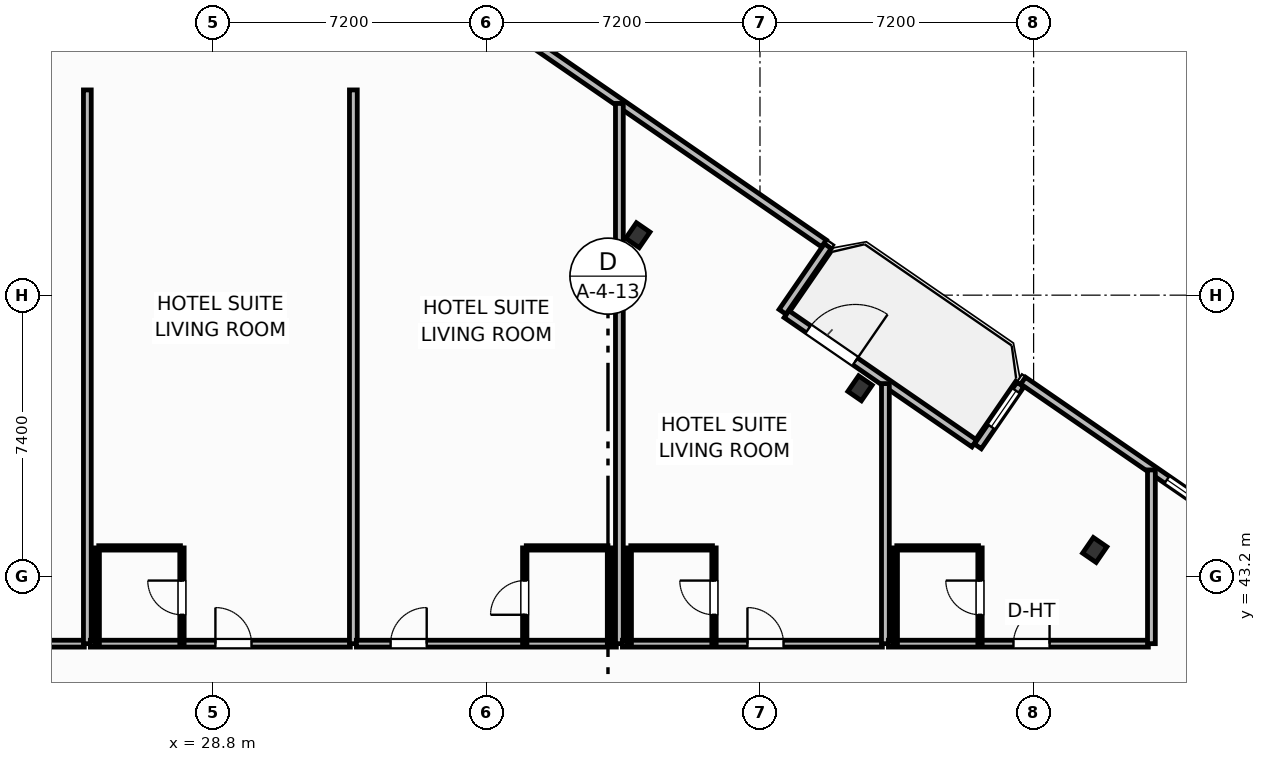
"""IFC4 building model, lengths in metres.
Left out: names, types, materials, properties, quantities, classifications, styles, units other than length and angle.
Written with IfcOpenShell. Run it as: python <this file> out.ifc"""

import sys

from ifc_helpers import new_model, si_unit, direction, frame, frame_2d, origin, origin_2d, place, context, subcontext, project, spatial, rectangle, i_section, extrude, element, fill, save


model = new_model("IFC4")
c1 = context("Model", 3, precision=1e-05, world=origin(), true_north=direction((0.0, 1.0)))
c2 = subcontext(c1, "Body", "Model", "MODEL_VIEW")
j1 = project(units=[si_unit("LENGTHUNIT", "METRE"), si_unit("PLANEANGLEUNIT", "RADIAN")], contexts=[c1])
p1 = place(None, origin())
s1 = spatial("IfcSite", under=j1, at=p1, CompositionType="ELEMENT")
p2 = place(p1, origin())
s2 = spatial("IfcBuilding", under=s1, at=p2, CompositionType="ELEMENT")
p3 = place(p2, frame((0.0, 0.0, 30.7)))
s3 = spatial("IfcBuildingStorey", under=s2, at=p3, CompositionType="ELEMENT", Elevation=30.7)
for number, where, z_axis, x_axis in (
    (1, (52.009, 43.896, 0.0), (0.0, 0.0, 1.0), (0.824, -0.567, 0.0)),
    (2, (45.833, 48.15, 0.0), (0.0, 0.0, 1.0), (0.824, -0.567, 0.0)),
    (3, (39.985, 52.177, 0.0), (0.0, 0.0, 1.0), (0.824, -0.567, 0.0)),
):
    element("IfcColumn", number, at=place(p3, frame(where, z_axis=z_axis, x_axis=x_axis)), inside=s3, PredefinedType="COLUMN", context=c2, shape_type="SweptSolid", body=[
        extrude(i_section(OverallWidth=0.432, OverallDepth=0.498, WebThickness=0.056, FlangeThickness=0.089, FilletRadius=0.025, at=origin_2d()), origin(), (0.0, 0.0, 1.0), 3.7),
    ])
p4 = place(p3, frame((43.898, 50.102, 0.0), z_axis=(0.0, 0.0, 1.0), x_axis=(0.823534636215, -0.567265989598, 0.0)))
e4 = element("IfcWall", 4, at=p4, inside=s3, PredefinedType="SOLIDWALL", context=c2, shape_type="SweptSolid", body=[
    extrude(rectangle(XDim=6.0, YDim=0.22, at=frame_2d((3.0, 0.0))), origin(), (0.0, 0.0, 1.0), 2.73),
])
p5 = place(p4, frame((0.696, 0.0, 0.0)))
e5 = element("IfcOpeningElement", 5, at=p5, cuts=e4, PredefinedType="OPENING", context=c2, shape_type="SweptSolid", body=[
    extrude(rectangle(XDim=1.5, YDim=2.25, at=frame_2d((0.75, 1.125))), frame((0.0, 0.12, 0.0), z_axis=(0.0, -1.0, 0.0), x_axis=(1.0, 0.0, 0.0)), (0.0, 0.0, 1.0), 0.24),
])
p6 = place(p3, frame((56.741, 43.793, 0.0), z_axis=(0.0, 0.0, 1.0), x_axis=(-0.823530942962, 0.56727135128, 0.0)))
e6 = element("IfcWall", 6, at=p6, inside=s3, PredefinedType="SOLIDWALL", context=c2, shape_type="SweptSolid", body=[
    extrude(rectangle(XDim=8.035, YDim=0.22, at=frame_2d((4.018, 0.0))), origin(), (0.0, 0.0, 1.0), 2.73),
])
p7 = place(p6, frame((1.788, 0.0, 0.8)))
e7 = element("IfcOpeningElement", 7, at=p7, cuts=e6, PredefinedType="OPENING", context=c2, shape_type="SweptSolid", body=[
    extrude(rectangle(XDim=1.65, YDim=1.65, at=frame_2d((0.825, 0.825))), frame((0.0, 0.12, 0.0), z_axis=(0.0, -1.0, 0.0), x_axis=(1.0, 0.0, 0.0)), (0.0, 0.0, 1.0), 0.24),
])
p8 = place(p3, frame((50.053, 48.248, 0.0), z_axis=(0.0, 0.0, 1.0), x_axis=(-0.567273565974, -0.823529417415, 0.0)))
e8 = element("IfcWall", 8, at=p8, inside=s3, PredefinedType="SOLIDWALL", context=c2, shape_type="SweptSolid", body=[
    extrude(rectangle(XDim=1.975, YDim=0.22, at=frame_2d((0.988, 0.0))), origin(), (0.0, 0.0, 1.0), 2.73),
])
p9 = place(p8, frame((0.2, 0.0, 0.8)))
e9 = element("IfcOpeningElement", 9, at=p9, cuts=e8, PredefinedType="OPENING", context=c2, shape_type="SweptSolid", body=[
    extrude(rectangle(XDim=1.15, YDim=1.4, at=frame_2d((0.575, 0.7))), frame((0.0, 0.12, 0.0), z_axis=(0.0, -1.0, 0.0), x_axis=(1.0, 0.0, 0.0)), (0.0, 0.0, 1.0), 0.24),
])
p10 = place(p3, frame((43.794, 50.161, 0.0), z_axis=(0.0, 0.0, 1.0), x_axis=(0.567352541689, 0.823475010816, 0.0)))
e10 = element("IfcWall", 10, at=p10, inside=s3, PredefinedType="SOLIDWALL", context=c2, shape_type="SweptSolid", body=[
    extrude(rectangle(XDim=2.1, YDim=0.22, at=frame_2d((1.05, 0.0))), origin(), (0.0, 0.0, 1.0), 2.73),
])
p11 = place(p3, frame((44.882, 51.962, 0.0), z_axis=(0.0, 0.0, 1.0), x_axis=(-0.823534427573, 0.567266292497, 0.0)))
e11 = element("IfcWall", 11, at=p11, inside=s3, PredefinedType="SOLIDWALL", context=c2, shape_type="SweptSolid", body=[
    extrude(rectangle(XDim=23.147, YDim=0.22, at=frame_2d((11.574, 0.0))), origin(), (0.0, 0.0, 1.0), 2.73),
])
p12 = place(p11, frame((10.749, 0.0, 0.8)))
e12 = element("IfcOpeningElement", 12, at=p12, cuts=e11, PredefinedType="OPENING", context=c2, shape_type="SweptSolid", body=[
    extrude(rectangle(XDim=1.65, YDim=1.65, at=frame_2d((0.825, 0.825))), frame((0.0, 0.12, 0.0), z_axis=(0.0, -1.0, 0.0), x_axis=(1.0, 0.0, 0.0)), (0.0, 0.0, 1.0), 0.24),
])
p13 = place(p3, frame((2.921, 41.43, 0.0), z_axis=(0.0, 0.0, 1.0), x_axis=(1.0, 0.0, 0.0)))
e13 = element("IfcWall", 13, at=p13, inside=s3, PredefinedType="PARTITIONING", context=c2, shape_type="SweptSolid", body=[
    extrude(rectangle(XDim=22.499, YDim=0.18, at=frame_2d((11.25, 0.0))), origin(), (0.0, 0.0, 1.0), 3.45),
])
p14 = place(p13, frame((18.35, 0.0, 0.0)))
e14 = element("IfcOpeningElement", 14, at=p14, cuts=e13, PredefinedType="OPENING", context=c2, shape_type="SweptSolid", body=[
    extrude(rectangle(XDim=0.95, YDim=2.15, at=frame_2d((0.475, 1.075))), frame((0.0, 0.1, 0.0), z_axis=(0.0, -1.0, 0.0), x_axis=(1.0, 0.0, 0.0)), (0.0, 0.0, 1.0), 0.2),
])
p15 = place(p3, frame((25.5, 41.43, 0.0), z_axis=(0.0, 0.0, 1.0), x_axis=(0.0, 1.0, 0.0)))
e15 = element("IfcWall", 15, at=p15, inside=s3, PredefinedType="PARTITIONING", context=c2, shape_type="SweptSolid", body=[
    extrude(rectangle(XDim=14.57, YDim=0.205, at=frame_2d((7.285, 0.0))), origin(), (0.0, 0.0, 1.0), 3.45),
])
p16 = place(p3, frame((25.58, 41.43, 0.0), z_axis=(0.0, 0.0, 1.0), x_axis=(1.0, 0.0, 0.0)))
e16 = element("IfcWall", 16, at=p16, inside=s3, PredefinedType="PARTITIONING", context=c2, shape_type="SweptSolid", body=[
    extrude(rectangle(XDim=6.84, YDim=0.18, at=frame_2d((3.42, 0.0))), origin(), (0.0, 0.0, 1.0), 3.45),
])
p17 = place(p16, frame((3.29, 0.0, 0.0)))
e17 = element("IfcOpeningElement", 17, at=p17, cuts=e16, PredefinedType="OPENING", context=c2, shape_type="SweptSolid", body=[
    extrude(rectangle(XDim=0.95, YDim=2.15, at=frame_2d((0.475, 1.075))), frame((0.0, 0.1, 0.0), z_axis=(0.0, -1.0, 0.0), x_axis=(1.0, 0.0, 0.0)), (0.0, 0.0, 1.0), 0.2),
])
p18 = place(p3, frame((25.8, 43.95, 0.0), z_axis=(0.0, 0.0, 1.0), x_axis=(1.0, 0.0, 0.0)))
e18 = element("IfcWall", 18, at=p18, inside=s3, PredefinedType="PARTITIONING", context=c2, shape_type="SweptSolid", body=[
    extrude(rectangle(XDim=2.15, YDim=0.115, at=frame_2d((1.075, 0.0))), origin(), (0.0, 0.0, 1.0), 3.45),
])
p19 = place(p3, frame((27.99, 41.43, 0.0), z_axis=(0.0, 0.0, 1.0), x_axis=(0.0, 1.0, 0.0)))
e19 = element("IfcWall", 19, at=p19, inside=s3, PredefinedType="PARTITIONING", context=c2, shape_type="SweptSolid", body=[
    extrude(rectangle(XDim=2.52, YDim=0.115, at=frame_2d((1.26, 0.0))), origin(), (0.0, 0.0, 1.0), 3.45),
])
p20 = place(p19, frame((0.76, 0.0, 0.0)))
e20 = element("IfcOpeningElement", 20, at=p20, cuts=e19, PredefinedType="OPENING", context=c2, shape_type="SweptSolid", body=[
    extrude(rectangle(XDim=0.9, YDim=2.05, at=frame_2d((0.45, 1.025))), frame((0.0, 0.067, 0.0), z_axis=(0.0, -1.0, 0.0), x_axis=(1.0, 0.0, 0.0)), (0.0, 0.0, 1.0), 0.135),
])
p21 = place(p3, frame((25.76, 41.43, 0.0), z_axis=(0.0, 0.0, 1.0), x_axis=(0.0, 1.0, 0.0)))
e21 = element("IfcWall", 21, at=p21, inside=s3, PredefinedType="PARTITIONING", context=c2, shape_type="SweptSolid", body=[
    extrude(rectangle(XDim=2.52, YDim=0.115, at=frame_2d((1.26, 0.0))), origin(), (0.0, 0.0, 1.0), 3.45),
])
p22 = place(p3, frame((32.5, 41.43, 0.0), z_axis=(0.0, 0.0, 1.0), x_axis=(0.0, 1.0, 0.0)))
e22 = element("IfcWall", 22, at=p22, inside=s3, PredefinedType="PARTITIONING", context=c2, shape_type="SweptSolid", body=[
    extrude(rectangle(XDim=14.57, YDim=0.205, at=frame_2d((7.285, 0.0))), origin(), (0.0, 0.0, 1.0), 3.45),
])
p23 = place(p3, frame((32.58, 41.43, 0.0), z_axis=(0.0, 0.0, 1.0), x_axis=(1.0, 0.0, 0.0)))
e23 = element("IfcWall", 23, at=p23, inside=s3, PredefinedType="PARTITIONING", context=c2, shape_type="SweptSolid", body=[
    extrude(rectangle(XDim=6.84, YDim=0.18, at=frame_2d((3.42, 0.0))), origin(), (0.0, 0.0, 1.0), 3.45),
])
p24 = place(p23, frame((0.9, 0.0, 0.0)))
e24 = element("IfcOpeningElement", 24, at=p24, cuts=e23, PredefinedType="OPENING", context=c2, shape_type="SweptSolid", body=[
    extrude(rectangle(XDim=0.95, YDim=2.15, at=frame_2d((0.475, 1.075))), frame((0.0, 0.1, 0.0), z_axis=(0.0, -1.0, 0.0), x_axis=(1.0, 0.0, 0.0)), (0.0, 0.0, 1.0), 0.2),
])
p25 = place(p3, frame((37.05, 43.95, 0.0), z_axis=(0.0, 0.0, 1.0), x_axis=(1.0, 0.0, 0.0)))
e25 = element("IfcWall", 25, at=p25, inside=s3, PredefinedType="PARTITIONING", context=c2, shape_type="SweptSolid", body=[
    extrude(rectangle(XDim=2.15, YDim=0.115, at=frame_2d((1.075, 0.0))), origin(), (0.0, 0.0, 1.0), 3.45),
])
p26 = place(p3, frame((37.01, 41.43, 0.0), z_axis=(0.0, 0.0, 1.0), x_axis=(0.0, 1.0, 0.0)))
e26 = element("IfcWall", 26, at=p26, inside=s3, PredefinedType="PARTITIONING", context=c2, shape_type="SweptSolid", body=[
    extrude(rectangle(XDim=2.52, YDim=0.115, at=frame_2d((1.26, 0.0))), origin(), (0.0, 0.0, 1.0), 3.45),
])
p27 = place(p26, frame((0.76, 0.0, 0.0)))
e27 = element("IfcOpeningElement", 27, at=p27, cuts=e26, PredefinedType="OPENING", context=c2, shape_type="SweptSolid", body=[
    extrude(rectangle(XDim=0.9, YDim=2.05, at=frame_2d((0.45, 1.025))), frame((0.0, 0.067, 0.0), z_axis=(0.0, -1.0, 0.0), x_axis=(1.0, 0.0, 0.0)), (0.0, 0.0, 1.0), 0.135),
])
p28 = place(p3, frame((39.24, 41.43, 0.0), z_axis=(0.0, 0.0, 1.0), x_axis=(0.0, 1.0, 0.0)))
e28 = element("IfcWall", 28, at=p28, inside=s3, PredefinedType="PARTITIONING", context=c2, shape_type="SweptSolid", body=[
    extrude(rectangle(XDim=2.52, YDim=0.115, at=frame_2d((1.26, 0.0))), origin(), (0.0, 0.0, 1.0), 3.45),
])
p29 = place(p3, frame((39.5, 41.43, 0.0), z_axis=(0.0, 0.0, 1.0), x_axis=(0.0, 1.0, 0.0)))
e29 = element("IfcWall", 29, at=p29, inside=s3, PredefinedType="PARTITIONING", context=c2, shape_type="SweptSolid", body=[
    extrude(rectangle(XDim=14.215, YDim=0.205, at=frame_2d((7.107, 0.0))), origin(), (0.0, 0.0, 1.0), 3.45),
])
p30 = place(p3, frame((39.58, 41.43, 0.0), z_axis=(0.0, 0.0, 1.0), x_axis=(1.0, 0.0, 0.0)))
e30 = element("IfcWall", 30, at=p30, inside=s3, PredefinedType="PARTITIONING", context=c2, shape_type="SweptSolid", body=[
    extrude(rectangle(XDim=6.84, YDim=0.18, at=frame_2d((3.42, 0.0))), origin(), (0.0, 0.0, 1.0), 3.45),
])
p31 = place(p30, frame((3.29, 0.0, 0.0)))
e31 = element("IfcOpeningElement", 31, at=p31, cuts=e30, PredefinedType="OPENING", context=c2, shape_type="SweptSolid", body=[
    extrude(rectangle(XDim=0.95, YDim=2.15, at=frame_2d((0.475, 1.075))), frame((0.0, 0.1, 0.0), z_axis=(0.0, -1.0, 0.0), x_axis=(1.0, 0.0, 0.0)), (0.0, 0.0, 1.0), 0.2),
])
p32 = place(p3, frame((39.8, 43.95, 0.0), z_axis=(0.0, 0.0, 1.0), x_axis=(1.0, 0.0, 0.0)))
e32 = element("IfcWall", 32, at=p32, inside=s3, PredefinedType="PARTITIONING", context=c2, shape_type="SweptSolid", body=[
    extrude(rectangle(XDim=2.15, YDim=0.115, at=frame_2d((1.075, 0.0))), origin(), (0.0, 0.0, 1.0), 3.45),
])
p33 = place(p3, frame((41.99, 41.43, 0.0), z_axis=(0.0, 0.0, 1.0), x_axis=(0.0, 1.0, 0.0)))
e33 = element("IfcWall", 33, at=p33, inside=s3, PredefinedType="PARTITIONING", context=c2, shape_type="SweptSolid", body=[
    extrude(rectangle(XDim=2.52, YDim=0.115, at=frame_2d((1.26, 0.0))), origin(), (0.0, 0.0, 1.0), 3.45),
])
p34 = place(p33, frame((0.76, 0.0, 0.0)))
e34 = element("IfcOpeningElement", 34, at=p34, cuts=e33, PredefinedType="OPENING", context=c2, shape_type="SweptSolid", body=[
    extrude(rectangle(XDim=0.9, YDim=2.05, at=frame_2d((0.45, 1.025))), frame((0.0, 0.067, 0.0), z_axis=(0.0, -1.0, 0.0), x_axis=(1.0, 0.0, 0.0)), (0.0, 0.0, 1.0), 0.135),
])
p35 = place(p3, frame((39.76, 41.43, 0.0), z_axis=(0.0, 0.0, 1.0), x_axis=(0.0, 1.0, 0.0)))
e35 = element("IfcWall", 35, at=p35, inside=s3, PredefinedType="PARTITIONING", context=c2, shape_type="SweptSolid", body=[
    extrude(rectangle(XDim=2.52, YDim=0.115, at=frame_2d((1.26, 0.0))), origin(), (0.0, 0.0, 1.0), 3.45),
])
p36 = place(p3, frame((46.5, 41.43, 0.0), z_axis=(0.0, 0.0, 1.0), x_axis=(0.0, 1.0, 0.0)))
e36 = element("IfcWall", 36, at=p36, inside=s3, PredefinedType="PARTITIONING", context=c2, shape_type="SweptSolid", body=[
    extrude(rectangle(XDim=6.843, YDim=0.205, at=frame_2d((3.421, 0.0))), origin(), (0.0, 0.0, 1.0), 2.58),
])
p37 = place(p3, frame((46.58, 41.43, 0.0), z_axis=(0.0, 0.0, 1.0), x_axis=(1.0, 0.0, 0.0)))
e37 = element("IfcWall", 37, at=p37, inside=s3, PredefinedType="PARTITIONING", context=c2, shape_type="SweptSolid", body=[
    extrude(rectangle(XDim=6.84, YDim=0.18, at=frame_2d((3.42, 0.0))), origin(), (0.0, 0.0, 1.0), 3.45),
])
p38 = place(p37, frame((3.29, 0.0, 0.0)))
e38 = element("IfcOpeningElement", 38, at=p38, cuts=e37, PredefinedType="OPENING", context=c2, shape_type="SweptSolid", body=[
    extrude(rectangle(XDim=0.95, YDim=2.15, at=frame_2d((0.475, 1.075))), frame((0.0, 0.1, 0.0), z_axis=(0.0, -1.0, 0.0), x_axis=(1.0, 0.0, 0.0)), (0.0, 0.0, 1.0), 0.2),
])
p39 = place(p3, frame((46.8, 43.95, 0.0), z_axis=(0.0, 0.0, 1.0), x_axis=(1.0, 0.0, 0.0)))
e39 = element("IfcWall", 39, at=p39, inside=s3, PredefinedType="PARTITIONING", context=c2, shape_type="SweptSolid", body=[
    extrude(rectangle(XDim=2.15, YDim=0.115, at=frame_2d((1.075, 0.0))), origin(), (0.0, 0.0, 1.0), 3.45),
])
p40 = place(p3, frame((48.99, 41.43, 0.0), z_axis=(0.0, 0.0, 1.0), x_axis=(0.0, 1.0, 0.0)))
e40 = element("IfcWall", 40, at=p40, inside=s3, PredefinedType="PARTITIONING", context=c2, shape_type="SweptSolid", body=[
    extrude(rectangle(XDim=2.52, YDim=0.115, at=frame_2d((1.26, 0.0))), origin(), (0.0, 0.0, 1.0), 3.45),
])
p41 = place(p40, frame((0.76, 0.0, 0.0)))
e41 = element("IfcOpeningElement", 41, at=p41, cuts=e40, PredefinedType="OPENING", context=c2, shape_type="SweptSolid", body=[
    extrude(rectangle(XDim=0.9, YDim=2.05, at=frame_2d((0.45, 1.025))), frame((0.0, 0.067, 0.0), z_axis=(0.0, -1.0, 0.0), x_axis=(1.0, 0.0, 0.0)), (0.0, 0.0, 1.0), 0.135),
])
p42 = place(p3, frame((46.76, 41.43, 0.0), z_axis=(0.0, 0.0, 1.0), x_axis=(0.0, 1.0, 0.0)))
e42 = element("IfcWall", 42, at=p42, inside=s3, PredefinedType="PARTITIONING", context=c2, shape_type="SweptSolid", body=[
    extrude(rectangle(XDim=2.52, YDim=0.115, at=frame_2d((1.26, 0.0))), origin(), (0.0, 0.0, 1.0), 2.58),
])
p43 = place(p3, frame((53.5, 41.43, 0.0), z_axis=(0.0, 0.0, 1.0), x_axis=(0.0, 1.0, 0.0)))
e43 = element("IfcWall", 43, at=p43, inside=s3, PredefinedType="PARTITIONING", context=c2, shape_type="SweptSolid", body=[
    extrude(rectangle(XDim=4.571, YDim=0.205, at=frame_2d((2.286, 0.0))), origin(), (0.0, 0.0, 1.0), 3.45),
])
p44 = place(p5, origin())
e44 = element("IfcDoor", 44, at=p44, inside=s3, OperationType="SINGLE_SWING_RIGHT", PredefinedType="DOOR", context=c2, shape_type="SweptSolid", body=[
    extrude(rectangle(XDim=1.5, YDim=2.25, at=frame_2d((0.75, 1.125))), frame((0.0, 0.025, 0.0), z_axis=(0.0, -1.0, 0.0), x_axis=(1.0, 0.0, 0.0)), (0.0, 0.0, 1.0), 0.05),
])
fill(e5, e44)
p45 = place(p7, origin())
e45 = element("IfcWindow", 45, at=p45, inside=s3, PartitioningType="SINGLE_PANEL", PredefinedType="WINDOW", context=c2, shape_type="SweptSolid", body=[
    extrude(rectangle(XDim=1.65, YDim=1.65, at=frame_2d((0.825, 0.825))), frame((0.0, 0.03, 0.0), z_axis=(0.0, -1.0, 0.0), x_axis=(1.0, 0.0, 0.0)), (0.0, 0.0, 1.0), 0.06),
])
fill(e7, e45)
p46 = place(p17, origin())
e46 = element("IfcDoor", 46, at=p46, inside=s3, OperationType="SINGLE_SWING_LEFT", PredefinedType="DOOR", context=c2, shape_type="SweptSolid", body=[
    extrude(rectangle(XDim=0.95, YDim=2.15, at=frame_2d((0.475, 1.075))), frame((0.0, 0.025, 0.0), z_axis=(0.0, -1.0, 0.0), x_axis=(1.0, 0.0, 0.0)), (0.0, 0.0, 1.0), 0.05),
])
fill(e17, e46)
p47 = place(p20, origin())
e47 = element("IfcDoor", 47, at=p47, inside=s3, OperationType="SINGLE_SWING_RIGHT", PredefinedType="DOOR", context=c2, shape_type="SweptSolid", body=[
    extrude(rectangle(XDim=0.9, YDim=2.05, at=frame_2d((0.45, 1.025))), frame((0.0, 0.025, 0.0), z_axis=(0.0, -1.0, 0.0), x_axis=(1.0, 0.0, 0.0)), (0.0, 0.0, 1.0), 0.05),
])
fill(e20, e47)
p48 = place(p24, origin())
e48 = element("IfcDoor", 48, at=p48, inside=s3, OperationType="SINGLE_SWING_RIGHT", PredefinedType="DOOR", context=c2, shape_type="SweptSolid", body=[
    extrude(rectangle(XDim=0.95, YDim=2.15, at=frame_2d((0.475, 1.075))), frame((0.0, 0.025, 0.0), z_axis=(0.0, -1.0, 0.0), x_axis=(1.0, 0.0, 0.0)), (0.0, 0.0, 1.0), 0.05),
])
fill(e24, e48)
p49 = place(p27, origin())
e49 = element("IfcDoor", 49, at=p49, inside=s3, OperationType="SINGLE_SWING_LEFT", PredefinedType="DOOR", context=c2, shape_type="SweptSolid", body=[
    extrude(rectangle(XDim=0.9, YDim=2.05, at=frame_2d((0.45, 1.025))), frame((0.0, 0.025, 0.0), z_axis=(0.0, -1.0, 0.0), x_axis=(1.0, 0.0, 0.0)), (0.0, 0.0, 1.0), 0.05),
])
fill(e27, e49)
p50 = place(p31, origin())
e50 = element("IfcDoor", 50, at=p50, inside=s3, OperationType="SINGLE_SWING_LEFT", PredefinedType="DOOR", context=c2, shape_type="SweptSolid", body=[
    extrude(rectangle(XDim=0.95, YDim=2.15, at=frame_2d((0.475, 1.075))), frame((0.0, 0.025, 0.0), z_axis=(0.0, -1.0, 0.0), x_axis=(1.0, 0.0, 0.0)), (0.0, 0.0, 1.0), 0.05),
])
fill(e31, e50)
p51 = place(p34, origin())
e51 = element("IfcDoor", 51, at=p51, inside=s3, OperationType="SINGLE_SWING_RIGHT", PredefinedType="DOOR", context=c2, shape_type="SweptSolid", body=[
    extrude(rectangle(XDim=0.9, YDim=2.05, at=frame_2d((0.45, 1.025))), frame((0.0, 0.025, 0.0), z_axis=(0.0, -1.0, 0.0), x_axis=(1.0, 0.0, 0.0)), (0.0, 0.0, 1.0), 0.05),
])
fill(e34, e51)
p52 = place(p38, origin())
e52 = element("IfcDoor", 52, at=p52, inside=s3, OperationType="SINGLE_SWING_RIGHT", PredefinedType="DOOR", context=c2, shape_type="SweptSolid", body=[
    extrude(rectangle(XDim=0.95, YDim=2.15, at=frame_2d((0.475, 1.075))), frame((0.0, 0.025, 0.0), z_axis=(0.0, -1.0, 0.0), x_axis=(1.0, 0.0, 0.0)), (0.0, 0.0, 1.0), 0.05),
])
fill(e38, e52)
p53 = place(p41, origin())
e53 = element("IfcDoor", 53, at=p53, inside=s3, OperationType="SINGLE_SWING_RIGHT", PredefinedType="DOOR", context=c2, shape_type="SweptSolid", body=[
    extrude(rectangle(XDim=0.9, YDim=2.05, at=frame_2d((0.45, 1.025))), frame((0.0, 0.025, 0.0), z_axis=(0.0, -1.0, 0.0), x_axis=(1.0, 0.0, 0.0)), (0.0, 0.0, 1.0), 0.05),
])
fill(e41, e53)
p54 = place(p9, origin())
e54 = element("IfcWindow", 54, at=p54, inside=s3, PartitioningType="SINGLE_PANEL", PredefinedType="WINDOW", context=c2, shape_type="SweptSolid", body=[
    extrude(rectangle(XDim=1.15, YDim=1.4, at=frame_2d((0.575, 0.7))), frame((0.0, 0.03, 0.0), z_axis=(0.0, -1.0, 0.0), x_axis=(1.0, 0.0, 0.0)), (0.0, 0.0, 1.0), 0.06),
])
fill(e9, e54)
save(model, sys.argv[1])
